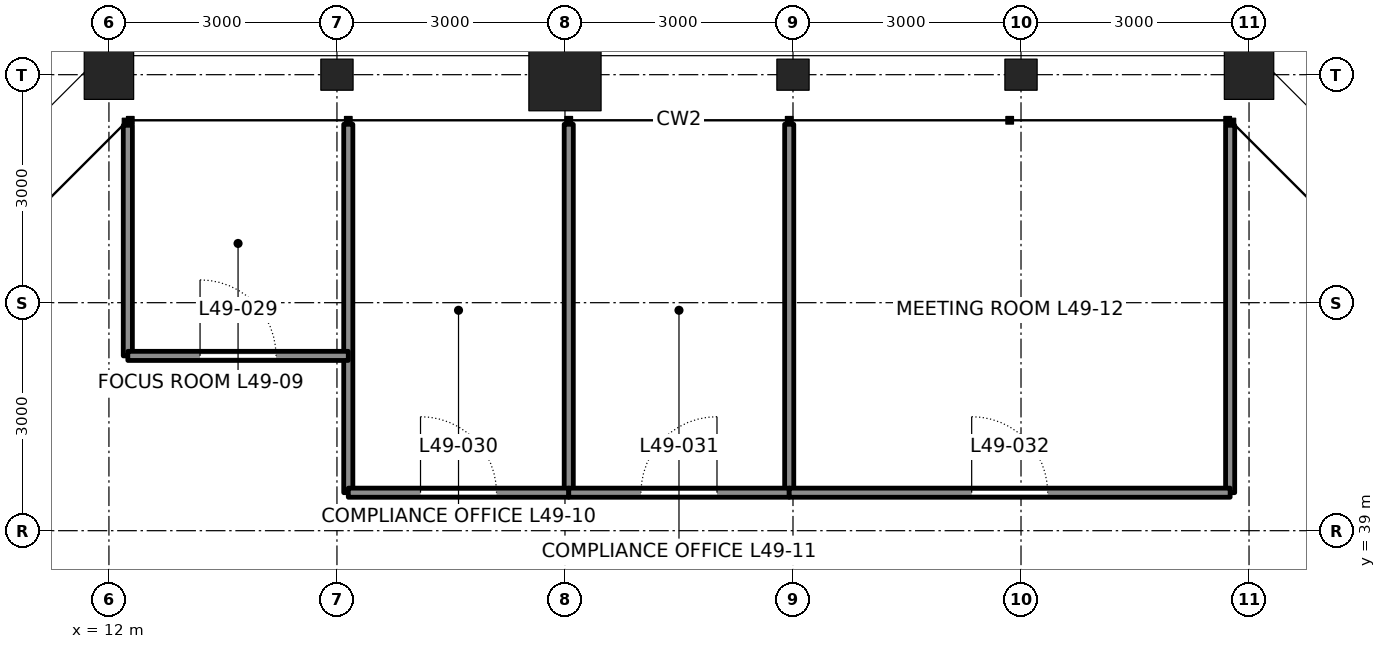
"""IFC4 building model, lengths in metres.
Left out: names, types, materials, properties, quantities, classifications, styles, units other than length and angle.
Written with IfcOpenShell. Run it as: python <this file> out.ifc"""

import sys

from ifc_helpers import new_model, si_unit, direction, frame, frame_2d, origin, origin_2d, place, context, subcontext, project, spatial, rectangle, hollow_rectangle, i_section, extrude, element, fill, save


model = new_model("IFC4")
c1 = context("Model", 3, precision=1e-05, world=origin(), true_north=direction((0.0, 1.0)))
c2 = subcontext(c1, "Body", "Model", "MODEL_VIEW")
j1 = project(units=[si_unit("LENGTHUNIT", "METRE"), si_unit("PLANEANGLEUNIT", "RADIAN")], contexts=[c1])
p1 = place(None, origin())
s1 = spatial("IfcSite", under=j1, at=p1, CompositionType="ELEMENT")
p2 = place(p1, origin())
s2 = spatial("IfcBuilding", under=s1, at=p2, CompositionType="ELEMENT")
p3 = place(p2, frame((0.0, 0.0, 222.3)))
s3 = spatial("IfcBuildingStorey", under=s2, at=p3, CompositionType="ELEMENT", Elevation=222.3)
p4 = place(p3, frame((27.0, 45.0, 0.0), z_axis=(0.0, 0.0, 1.0), x_axis=(0.0, 1.0, 0.0)))
e1 = element("IfcColumn", 1, at=p4, inside=s3, PredefinedType="COLUMN", context=c2, shape_type="SweptSolid", body=[
    extrude(hollow_rectangle(XDim=0.65, YDim=0.65, WallThickness=0.065, at=origin_2d()), origin(), (0.0, 0.0, 1.0), 4.2),
])
for number, where, z_axis, x_axis in (
    (2, (24.0, 45.0, 0.0), (0.0, 0.0, 1.0), (0.0, 1.0, 0.0)),
    (3, (21.0, 45.0, 0.0), (0.0, 0.0, 1.0), (0.0, 1.0, 0.0)),
):
    element("IfcColumn", number, at=place(p3, frame(where, z_axis=z_axis, x_axis=x_axis)), inside=s3, PredefinedType="COLUMN", context=c2, shape_type="SweptSolid", body=[
        extrude(i_section(OverallWidth=0.409, OverallDepth=0.424, WebThickness=0.033, FlangeThickness=0.052, at=origin_2d()), origin(), (0.0, 0.0, 1.0), 4.2),
    ])
p5 = place(p3, frame((18.0, 45.0, 0.0), z_axis=(0.0, 0.0, 1.0), x_axis=(0.0, 1.0, 0.0)))
e4 = element("IfcColumn", 4, at=p5, inside=s3, PredefinedType="COLUMN", context=c2, shape_type="SweptSolid", body=[
    extrude(hollow_rectangle(XDim=0.95, YDim=0.95, WallThickness=0.11, at=origin_2d()), origin(), (0.0, 0.0, 1.0), 4.2),
])
p6 = place(p3, frame((15.0, 45.0, 0.0), z_axis=(0.0, 0.0, 1.0), x_axis=(0.0, 1.0, 0.0)))
e5 = element("IfcColumn", 5, at=p6, inside=s3, PredefinedType="COLUMN", context=c2, shape_type="SweptSolid", body=[
    extrude(i_section(OverallWidth=0.409, OverallDepth=0.424, WebThickness=0.033, FlangeThickness=0.052, at=origin_2d()), origin(), (0.0, 0.0, 1.0), 4.2),
])
p7 = place(p3, frame((12.0, 45.0, 0.0), z_axis=(0.0, 0.0, 1.0), x_axis=(0.0, 1.0, 0.0)))
e6 = element("IfcColumn", 6, at=p7, inside=s3, PredefinedType="COLUMN", context=c2, shape_type="SweptSolid", body=[
    extrude(hollow_rectangle(XDim=0.65, YDim=0.65, WallThickness=0.065, at=origin_2d()), origin(), (0.0, 0.0, 1.0), 4.2),
])
p8 = place(p3, frame((12.249, 44.334, 0.0), z_axis=(0.0, 0.0, 1.0), x_axis=(0.0, -1.0, 0.0)))
e7 = element("IfcWall", 7, at=p8, inside=s3, PredefinedType="PARTITIONING", context=c2, shape_type="SweptSolid", body=[
    extrude(rectangle(XDim=3.034, YDim=0.12, at=frame_2d((1.517, 0.0))), origin(), (0.0, 0.0, 1.0), 4.04),
])
p9 = place(p3, frame((15.149, 44.347, 0.0), z_axis=(0.0, 0.0, 1.0), x_axis=(0.0, -1.0, 0.0)))
e8 = element("IfcWall", 8, at=p9, inside=s3, PredefinedType="PARTITIONING", context=c2, shape_type="SweptSolid", body=[
    extrude(rectangle(XDim=4.847, YDim=0.12, at=frame_2d((2.424, 0.0))), origin(), (0.0, 0.0, 1.0), 4.04),
])
for number, where, z_axis, x_axis in (
    (9, (18.05, 44.347, 0.0), (0.0, 0.0, 1.0), (0.0, -1.0, 0.0)),
    (10, (20.95, 44.347, 0.0), (0.0, 0.0, 1.0), (0.0, -1.0, 0.0)),
):
    element("IfcWall", number, at=place(p3, frame(where, z_axis=z_axis, x_axis=x_axis)), inside=s3, PredefinedType="PARTITIONING", context=c2, shape_type="SweptSolid", body=[
        extrude(rectangle(XDim=4.847, YDim=0.12, at=frame_2d((2.424, 0.0))), origin(), (0.0, 0.0, 1.0), 3.357),
    ])
p10 = place(p3, frame((26.751, 44.334, 0.0), z_axis=(0.0, 0.0, 1.0), x_axis=(0.0, -1.0, 0.0)))
e11 = element("IfcWall", 11, at=p10, inside=s3, PredefinedType="PARTITIONING", context=c2, shape_type="SweptSolid", body=[
    extrude(rectangle(XDim=4.834, YDim=0.12, at=frame_2d((2.417, 0.0))), origin(), (0.0, 0.0, 1.0), 4.04),
])
p11 = place(p3, frame((12.249, 41.3, 0.0), z_axis=(0.0, 0.0, 1.0), x_axis=(1.0, 0.0, 0.0)))
e12 = element("IfcWall", 12, at=p11, inside=s3, PredefinedType="PARTITIONING", context=c2, shape_type="SweptSolid", body=[
    extrude(rectangle(XDim=2.901, YDim=0.12, at=frame_2d((1.45, 0.0))), origin(), (0.0, 0.0, 1.0), 4.04),
])
p12 = place(p11, frame((0.95, 0.0, 0.0)))
e13 = element("IfcOpeningElement", 13, at=p12, cuts=e12, PredefinedType="OPENING", context=c2, shape_type="SweptSolid", body=[
    extrude(rectangle(XDim=1.0, YDim=2.4, at=frame_2d((0.5, 1.2))), frame((0.0, 0.07, 0.0), z_axis=(0.0, -1.0, 0.0), x_axis=(1.0, 0.0, 0.0)), (0.0, 0.0, 1.0), 0.14),
])
p13 = place(p3, frame((15.149, 39.5, 0.0), z_axis=(0.0, 0.0, 1.0), x_axis=(1.0, 0.0, 0.0)))
e14 = element("IfcWall", 14, at=p13, inside=s3, PredefinedType="PARTITIONING", context=c2, shape_type="SweptSolid", body=[
    extrude(rectangle(XDim=2.901, YDim=0.12, at=frame_2d((1.45, 0.0))), origin(), (0.0, 0.0, 1.0), 4.04),
])
p14 = place(p13, frame((0.95, 0.0, 0.0)))
e15 = element("IfcOpeningElement", 15, at=p14, cuts=e14, PredefinedType="OPENING", context=c2, shape_type="SweptSolid", body=[
    extrude(rectangle(XDim=1.0, YDim=2.4, at=frame_2d((0.5, 1.2))), frame((0.0, 0.07, 0.0), z_axis=(0.0, -1.0, 0.0), x_axis=(1.0, 0.0, 0.0)), (0.0, 0.0, 1.0), 0.14),
])
p15 = place(p3, frame((18.05, 39.5, 0.0), z_axis=(0.0, 0.0, 1.0), x_axis=(1.0, 0.0, 0.0)))
e16 = element("IfcWall", 16, at=p15, inside=s3, PredefinedType="PARTITIONING", context=c2, shape_type="SweptSolid", body=[
    extrude(rectangle(XDim=2.9, YDim=0.12, at=frame_2d((1.45, 0.0))), origin(), (0.0, 0.0, 1.0), 4.04),
])
p16 = place(p15, frame((0.95, 0.0, 0.0)))
e17 = element("IfcOpeningElement", 17, at=p16, cuts=e16, PredefinedType="OPENING", context=c2, shape_type="SweptSolid", body=[
    extrude(rectangle(XDim=1.0, YDim=2.4, at=frame_2d((0.5, 1.2))), frame((0.0, 0.07, 0.0), z_axis=(0.0, -1.0, 0.0), x_axis=(1.0, 0.0, 0.0)), (0.0, 0.0, 1.0), 0.14),
])
p17 = place(p3, frame((20.95, 39.5, 0.0), z_axis=(0.0, 0.0, 1.0), x_axis=(1.0, 0.0, 0.0)))
e18 = element("IfcWall", 18, at=p17, inside=s3, PredefinedType="PARTITIONING", context=c2, shape_type="SweptSolid", body=[
    extrude(rectangle(XDim=5.801, YDim=0.12, at=frame_2d((2.901, 0.0))), origin(), (0.0, 0.0, 1.0), 4.04),
])
p18 = place(p17, frame((2.401, 0.0, 0.0)))
e19 = element("IfcOpeningElement", 19, at=p18, cuts=e18, PredefinedType="OPENING", context=c2, shape_type="SweptSolid", body=[
    extrude(rectangle(XDim=1.0, YDim=2.4, at=frame_2d((0.5, 1.2))), frame((0.0, 0.07, 0.0), z_axis=(0.0, -1.0, 0.0), x_axis=(1.0, 0.0, 0.0)), (0.0, 0.0, 1.0), 0.14),
])
p19 = place(p12, origin())
e20 = element("IfcDoor", 20, at=p19, inside=s3, OperationType="SINGLE_SWING_LEFT", PredefinedType="DOOR", context=c2, shape_type="SweptSolid", body=[
    extrude(rectangle(XDim=1.0, YDim=2.4, at=frame_2d((0.5, 1.2))), frame((0.0, 0.025, 0.0), z_axis=(0.0, -1.0, 0.0), x_axis=(1.0, 0.0, 0.0)), (0.0, 0.0, 1.0), 0.05),
])
fill(e13, e20)
p20 = place(p14, origin())
e21 = element("IfcDoor", 21, at=p20, inside=s3, OperationType="SINGLE_SWING_LEFT", PredefinedType="DOOR", context=c2, shape_type="SweptSolid", body=[
    extrude(rectangle(XDim=1.0, YDim=2.4, at=frame_2d((0.5, 1.2))), frame((0.0, 0.025, 0.0), z_axis=(0.0, -1.0, 0.0), x_axis=(1.0, 0.0, 0.0)), (0.0, 0.0, 1.0), 0.05),
])
fill(e15, e21)
p21 = place(p16, origin())
e22 = element("IfcDoor", 22, at=p21, inside=s3, OperationType="SINGLE_SWING_RIGHT", PredefinedType="DOOR", context=c2, shape_type="SweptSolid", body=[
    extrude(rectangle(XDim=1.0, YDim=2.4, at=frame_2d((0.5, 1.2))), frame((0.0, 0.025, 0.0), z_axis=(0.0, -1.0, 0.0), x_axis=(1.0, 0.0, 0.0)), (0.0, 0.0, 1.0), 0.05),
])
fill(e17, e22)
p22 = place(p18, origin())
e23 = element("IfcDoor", 23, at=p22, inside=s3, OperationType="SINGLE_SWING_LEFT", PredefinedType="DOOR", context=c2, shape_type="SweptSolid", body=[
    extrude(rectangle(XDim=1.0, YDim=2.4, at=frame_2d((0.5, 1.2))), frame((0.0, 0.025, 0.0), z_axis=(0.0, -1.0, 0.0), x_axis=(1.0, 0.0, 0.0)), (0.0, 0.0, 1.0), 0.05),
])
fill(e19, e23)
save(model, sys.argv[1])
